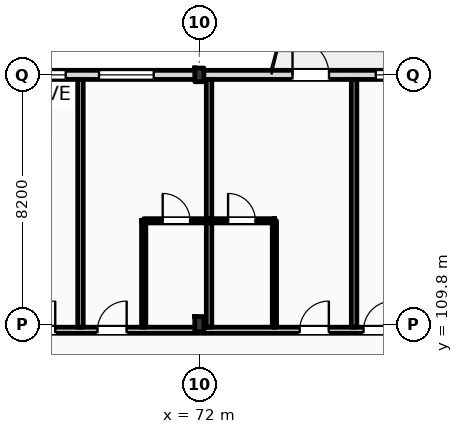
"""IFC4 building model, lengths in metres.
Left out: names, types, materials, properties, quantities, classifications, styles, units other than length and angle.
Written with IfcOpenShell. Run it as: python <this file> out.ifc"""

import sys

from ifc_helpers import new_model, si_unit, direction, frame, frame_2d, origin, origin_2d, place, context, subcontext, project, spatial, rectangle, i_section, extrude, element, fill, save


model = new_model("IFC4")
c1 = context("Model", 3, precision=1e-05, world=origin(), true_north=direction((0.0, 1.0)))
c2 = subcontext(c1, "Body", "Model", "MODEL_VIEW")
j1 = project(units=[si_unit("LENGTHUNIT", "METRE"), si_unit("PLANEANGLEUNIT", "RADIAN")], contexts=[c1])
p1 = place(None, origin())
s1 = spatial("IfcSite", under=j1, at=p1, CompositionType="ELEMENT")
p2 = place(p1, origin())
s2 = spatial("IfcBuilding", under=s1, at=p2, CompositionType="ELEMENT")
p3 = place(p2, frame((0.0, 0.0, 35.4)))
s3 = spatial("IfcBuildingStorey", under=s2, at=p3, CompositionType="ELEMENT", Elevation=35.4)
p4 = place(p3, frame((72.0, 109.8, 0.0), z_axis=(0.0, 0.0, 1.0), x_axis=(1.0, 0.0, 0.0)))
e1 = element("IfcColumn", 1, at=p4, inside=s3, PredefinedType="COLUMN", context=c2, shape_type="SweptSolid", body=[
    extrude(i_section(OverallWidth=0.3, OverallDepth=0.5, WebThickness=0.014, FlangeThickness=0.028, FilletRadius=0.027, at=origin_2d()), origin(), (0.0, 0.0, 1.0), 3.6),
])
p5 = place(p3, frame((72.0, 118.0, 0.0), z_axis=(0.0, 0.0, 1.0), x_axis=(1.0, 0.0, 0.0)))
e2 = element("IfcColumn", 2, at=p5, inside=s3, PredefinedType="COLUMN", context=c2, shape_type="SweptSolid", body=[
    extrude(i_section(OverallWidth=0.3, OverallDepth=0.45, WebThickness=0.014, FlangeThickness=0.026, FilletRadius=0.027, at=origin_2d()), origin(), (0.0, 0.0, 1.0), 3.6),
])
p6 = place(p3, frame((22.5, 118.0, 0.0), z_axis=(0.0, 0.0, 1.0), x_axis=(1.0, 0.0, 0.0)))
e3 = element("IfcWall", 3, at=p6, inside=s3, PredefinedType="STANDARD", context=c2, shape_type="SweptSolid", body=[
    extrude(rectangle(XDim=72.9, YDim=0.3, at=frame_2d((36.45, 0.0))), origin(), (0.0, 0.0, 1.0), 2.92),
])
p7 = place(p6, frame((0.91, 0.0, 0.9)))
e4 = element("IfcOpeningElement", 4, at=p7, cuts=e3, PredefinedType="OPENING", context=c2, shape_type="SweptSolid", body=[
    extrude(rectangle(XDim=0.9, YDim=1.84, at=frame_2d((0.45, 0.92))), frame((0.0, 0.16, 0.0), z_axis=(0.0, -1.0, 0.0), x_axis=(1.0, 0.0, 0.0)), (0.0, 0.0, 1.0), 0.32),
])
p8 = place(p6, frame((6.665, 0.0, 0.0)))
e5 = element("IfcOpeningElement", 5, at=p8, cuts=e3, PredefinedType="OPENING", context=c2, shape_type="SweptSolid", body=[
    extrude(rectangle(XDim=1.2, YDim=2.25, at=frame_2d((0.6, 1.125))), frame((0.0, 0.16, 0.0), z_axis=(0.0, -1.0, 0.0), x_axis=(1.0, 0.0, 0.0)), (0.0, 0.0, 1.0), 0.32),
])
p9 = place(p6, frame((11.355, 0.0, 0.9)))
e6 = element("IfcOpeningElement", 6, at=p9, cuts=e3, PredefinedType="OPENING", context=c2, shape_type="SweptSolid", body=[
    extrude(rectangle(XDim=1.1, YDim=1.5, at=frame_2d((0.55, 0.75))), frame((0.0, 0.16, 0.0), z_axis=(0.0, -1.0, 0.0), x_axis=(1.0, 0.0, 0.0)), (0.0, 0.0, 1.0), 0.32),
])
p10 = place(p6, frame((15.58, 0.0, 0.9)))
e7 = element("IfcOpeningElement", 7, at=p10, cuts=e3, PredefinedType="OPENING", context=c2, shape_type="SweptSolid", body=[
    extrude(rectangle(XDim=1.25, YDim=1.6, at=frame_2d((0.625, 0.8))), frame((0.0, 0.16, 0.0), z_axis=(0.0, -1.0, 0.0), x_axis=(1.0, 0.0, 0.0)), (0.0, 0.0, 1.0), 0.32),
])
p11 = place(p6, frame((21.08, 0.0, 0.0)))
e8 = element("IfcOpeningElement", 8, at=p11, cuts=e3, PredefinedType="OPENING", context=c2, shape_type="SweptSolid", body=[
    extrude(rectangle(XDim=1.2, YDim=2.25, at=frame_2d((0.6, 1.125))), frame((0.0, 0.16, 0.0), z_axis=(0.0, -1.0, 0.0), x_axis=(1.0, 0.0, 0.0)), (0.0, 0.0, 1.0), 0.32),
])
p12 = place(p6, frame((23.54, 0.0, 0.0)))
e9 = element("IfcOpeningElement", 9, at=p12, cuts=e3, PredefinedType="OPENING", context=c2, shape_type="SweptSolid", body=[
    extrude(rectangle(XDim=1.2, YDim=2.25, at=frame_2d((0.6, 1.125))), frame((0.0, 0.16, 0.0), z_axis=(0.0, -1.0, 0.0), x_axis=(1.0, 0.0, 0.0)), (0.0, 0.0, 1.0), 0.32),
])
p13 = place(p6, frame((28.83, 0.0, 0.9)))
e10 = element("IfcOpeningElement", 10, at=p13, cuts=e3, PredefinedType="OPENING", context=c2, shape_type="SweptSolid", body=[
    extrude(rectangle(XDim=1.75, YDim=1.84, at=frame_2d((0.875, 0.92))), frame((0.0, 0.16, 0.0), z_axis=(0.0, -1.0, 0.0), x_axis=(1.0, 0.0, 0.0)), (0.0, 0.0, 1.0), 0.32),
])
p14 = place(p6, frame((34.805, 0.0, 0.9)))
e11 = element("IfcOpeningElement", 11, at=p14, cuts=e3, PredefinedType="OPENING", context=c2, shape_type="SweptSolid", body=[
    extrude(rectangle(XDim=1.35, YDim=1.84, at=frame_2d((0.675, 0.92))), frame((0.0, 0.16, 0.0), z_axis=(0.0, -1.0, 0.0), x_axis=(1.0, 0.0, 0.0)), (0.0, 0.0, 1.0), 0.32),
])
p15 = place(p6, frame((38.105, 0.0, 0.0)))
e12 = element("IfcOpeningElement", 12, at=p15, cuts=e3, PredefinedType="OPENING", context=c2, shape_type="SweptSolid", body=[
    extrude(rectangle(XDim=1.2, YDim=2.25, at=frame_2d((0.6, 1.125))), frame((0.0, 0.16, 0.0), z_axis=(0.0, -1.0, 0.0), x_axis=(1.0, 0.0, 0.0)), (0.0, 0.0, 1.0), 0.32),
])
p16 = place(p6, frame((42.505, 0.0, 0.9)))
e13 = element("IfcOpeningElement", 13, at=p16, cuts=e3, PredefinedType="OPENING", context=c2, shape_type="SweptSolid", body=[
    extrude(rectangle(XDim=2.6, YDim=1.84, at=frame_2d((1.3, 0.92))), frame((0.0, 0.16, 0.0), z_axis=(0.0, -1.0, 0.0), x_axis=(1.0, 0.0, 0.0)), (0.0, 0.0, 1.0), 0.32),
])
p17 = place(p6, frame((46.2, 0.0, 0.9)))
e14 = element("IfcOpeningElement", 14, at=p17, cuts=e3, PredefinedType="OPENING", context=c2, shape_type="SweptSolid", body=[
    extrude(rectangle(XDim=1.8, YDim=1.84, at=frame_2d((0.9, 0.92))), frame((0.0, 0.16, 0.0), z_axis=(0.0, -1.0, 0.0), x_axis=(1.0, 0.0, 0.0)), (0.0, 0.0, 1.0), 0.32),
])
p18 = place(p6, frame((52.565, 0.0, 0.0)))
e15 = element("IfcOpeningElement", 15, at=p18, cuts=e3, PredefinedType="OPENING", context=c2, shape_type="SweptSolid", body=[
    extrude(rectangle(XDim=1.2, YDim=2.25, at=frame_2d((0.6, 1.125))), frame((0.0, 0.16, 0.0), z_axis=(0.0, -1.0, 0.0), x_axis=(1.0, 0.0, 0.0)), (0.0, 0.0, 1.0), 0.32),
])
p19 = place(p6, frame((55.305, 0.0, 0.9)))
e16 = element("IfcOpeningElement", 16, at=p19, cuts=e3, PredefinedType="OPENING", context=c2, shape_type="SweptSolid", body=[
    extrude(rectangle(XDim=1.2, YDim=1.8, at=frame_2d((0.6, 0.9))), frame((0.0, 0.16, 0.0), z_axis=(0.0, -1.0, 0.0), x_axis=(1.0, 0.0, 0.0)), (0.0, 0.0, 1.0), 0.32),
])
p20 = place(p6, frame((60.53, 0.0, 0.9)))
e17 = element("IfcOpeningElement", 17, at=p20, cuts=e3, PredefinedType="OPENING", context=c2, shape_type="SweptSolid", body=[
    extrude(rectangle(XDim=1.35, YDim=1.84, at=frame_2d((0.675, 0.92))), frame((0.0, 0.16, 0.0), z_axis=(0.0, -1.0, 0.0), x_axis=(1.0, 0.0, 0.0)), (0.0, 0.0, 1.0), 0.32),
])
p21 = place(p6, frame((65.955, 0.0, 0.9)))
e18 = element("IfcOpeningElement", 18, at=p21, cuts=e3, PredefinedType="OPENING", context=c2, shape_type="SweptSolid", body=[
    extrude(rectangle(XDim=1.35, YDim=1.84, at=frame_2d((0.675, 0.92))), frame((0.0, 0.16, 0.0), z_axis=(0.0, -1.0, 0.0), x_axis=(1.0, 0.0, 0.0)), (0.0, 0.0, 1.0), 0.32),
])
p22 = place(p6, frame((69.335, 0.0, 0.9)))
e19 = element("IfcOpeningElement", 19, at=p22, cuts=e3, PredefinedType="OPENING", context=c2, shape_type="SweptSolid", body=[
    extrude(rectangle(XDim=1.65, YDim=1.84, at=frame_2d((0.825, 0.92))), frame((0.0, 0.16, 0.0), z_axis=(0.0, -1.0, 0.0), x_axis=(1.0, 0.0, 0.0)), (0.0, 0.0, 1.0), 0.32),
])
p23 = place(p3, frame((10.65, 109.6, 0.0), z_axis=(0.0, 0.0, 1.0), x_axis=(1.0, 0.0, 0.0)))
e20 = element("IfcWall", 20, at=p23, inside=s3, PredefinedType="PARTITIONING", context=c2, shape_type="SweptSolid", body=[
    extrude(rectangle(XDim=84.61, YDim=0.2, at=frame_2d((42.305, 0.0))), origin(), (0.0, 0.0, 1.0), 2.82),
])
p24 = place(p23, frame((12.675, 0.0, 0.0)))
e21 = element("IfcOpeningElement", 21, at=p24, cuts=e20, PredefinedType="OPENING", context=c2, shape_type="SweptSolid", body=[
    extrude(rectangle(XDim=1.02, YDim=2.2, at=frame_2d((0.51, 1.1))), frame((0.0, 0.11, 0.0), z_axis=(0.0, -1.0, 0.0), x_axis=(1.0, 0.0, 0.0)), (0.0, 0.0, 1.0), 0.22),
])
p25 = place(p23, frame((19.62, 0.0, 0.0)))
e22 = element("IfcOpeningElement", 22, at=p25, cuts=e20, PredefinedType="OPENING", context=c2, shape_type="SweptSolid", body=[
    extrude(rectangle(XDim=1.02, YDim=2.2, at=frame_2d((0.51, 1.1))), frame((0.0, 0.11, 0.0), z_axis=(0.0, -1.0, 0.0), x_axis=(1.0, 0.0, 0.0)), (0.0, 0.0, 1.0), 0.22),
])
p26 = place(p23, frame((24.12, 0.0, 0.0)))
e23 = element("IfcOpeningElement", 23, at=p26, cuts=e20, PredefinedType="OPENING", context=c2, shape_type="SweptSolid", body=[
    extrude(rectangle(XDim=1.02, YDim=2.2, at=frame_2d((0.51, 1.1))), frame((0.0, 0.11, 0.0), z_axis=(0.0, -1.0, 0.0), x_axis=(1.0, 0.0, 0.0)), (0.0, 0.0, 1.0), 0.22),
])
p27 = place(p23, frame((26.47, 0.0, 0.0)))
e24 = element("IfcOpeningElement", 24, at=p27, cuts=e20, PredefinedType="OPENING", context=c2, shape_type="SweptSolid", body=[
    extrude(rectangle(XDim=1.02, YDim=2.2, at=frame_2d((0.51, 1.1))), frame((0.0, 0.11, 0.0), z_axis=(0.0, -1.0, 0.0), x_axis=(1.0, 0.0, 0.0)), (0.0, 0.0, 1.0), 0.22),
])
p28 = place(p23, frame((33.15, 0.0, 0.0)))
e25 = element("IfcOpeningElement", 25, at=p28, cuts=e20, PredefinedType="OPENING", context=c2, shape_type="SweptSolid", body=[
    extrude(rectangle(XDim=0.96, YDim=2.2, at=frame_2d((0.48, 1.1))), frame((0.0, 0.11, 0.0), z_axis=(0.0, -1.0, 0.0), x_axis=(1.0, 0.0, 0.0)), (0.0, 0.0, 1.0), 0.22),
])
p29 = place(p23, frame((35.5, 0.0, 0.0)))
e26 = element("IfcOpeningElement", 26, at=p29, cuts=e20, PredefinedType="OPENING", context=c2, shape_type="SweptSolid", body=[
    extrude(rectangle(XDim=0.96, YDim=2.2, at=frame_2d((0.48, 1.1))), frame((0.0, 0.11, 0.0), z_axis=(0.0, -1.0, 0.0), x_axis=(1.0, 0.0, 0.0)), (0.0, 0.0, 1.0), 0.22),
])
p30 = place(p23, frame((42.15, 0.0, 0.0)))
e27 = element("IfcOpeningElement", 27, at=p30, cuts=e20, PredefinedType="OPENING", context=c2, shape_type="SweptSolid", body=[
    extrude(rectangle(XDim=0.96, YDim=2.2, at=frame_2d((0.48, 1.1))), frame((0.0, 0.11, 0.0), z_axis=(0.0, -1.0, 0.0), x_axis=(1.0, 0.0, 0.0)), (0.0, 0.0, 1.0), 0.22),
])
p31 = place(p23, frame((47.15, 0.0, 0.0)))
e28 = element("IfcOpeningElement", 28, at=p31, cuts=e20, PredefinedType="OPENING", context=c2, shape_type="SweptSolid", body=[
    extrude(rectangle(XDim=0.96, YDim=2.2, at=frame_2d((0.48, 1.1))), frame((0.0, 0.11, 0.0), z_axis=(0.0, -1.0, 0.0), x_axis=(1.0, 0.0, 0.0)), (0.0, 0.0, 1.0), 0.22),
])
p32 = place(p23, frame((51.15, 0.0, 0.0)))
e29 = element("IfcOpeningElement", 29, at=p32, cuts=e20, PredefinedType="OPENING", context=c2, shape_type="SweptSolid", body=[
    extrude(rectangle(XDim=0.96, YDim=2.2, at=frame_2d((0.48, 1.1))), frame((0.0, 0.11, 0.0), z_axis=(0.0, -1.0, 0.0), x_axis=(1.0, 0.0, 0.0)), (0.0, 0.0, 1.0), 0.22),
])
p33 = place(p23, frame((55.65, 0.0, 0.0)))
e30 = element("IfcOpeningElement", 30, at=p33, cuts=e20, PredefinedType="OPENING", context=c2, shape_type="SweptSolid", body=[
    extrude(rectangle(XDim=0.96, YDim=2.2, at=frame_2d((0.48, 1.1))), frame((0.0, 0.11, 0.0), z_axis=(0.0, -1.0, 0.0), x_axis=(1.0, 0.0, 0.0)), (0.0, 0.0, 1.0), 0.22),
])
p34 = place(p23, frame((58.0, 0.0, 0.0)))
e31 = element("IfcOpeningElement", 31, at=p34, cuts=e20, PredefinedType="OPENING", context=c2, shape_type="SweptSolid", body=[
    extrude(rectangle(XDim=0.96, YDim=2.2, at=frame_2d((0.48, 1.1))), frame((0.0, 0.11, 0.0), z_axis=(0.0, -1.0, 0.0), x_axis=(1.0, 0.0, 0.0)), (0.0, 0.0, 1.0), 0.22),
])
p35 = place(p23, frame((64.65, 0.0, 0.0)))
e32 = element("IfcOpeningElement", 32, at=p35, cuts=e20, PredefinedType="OPENING", context=c2, shape_type="SweptSolid", body=[
    extrude(rectangle(XDim=0.96, YDim=2.2, at=frame_2d((0.48, 1.1))), frame((0.0, 0.11, 0.0), z_axis=(0.0, -1.0, 0.0), x_axis=(1.0, 0.0, 0.0)), (0.0, 0.0, 1.0), 0.22),
])
p36 = place(p23, frame((66.75, 0.0, 0.0)))
e33 = element("IfcOpeningElement", 33, at=p36, cuts=e20, PredefinedType="OPENING", context=c2, shape_type="SweptSolid", body=[
    extrude(rectangle(XDim=0.96, YDim=2.2, at=frame_2d((0.48, 1.1))), frame((0.0, 0.11, 0.0), z_axis=(0.0, -1.0, 0.0), x_axis=(1.0, 0.0, 0.0)), (0.0, 0.0, 1.0), 0.22),
])
p37 = place(p23, frame((73.65, 0.0, 0.0)))
e34 = element("IfcOpeningElement", 34, at=p37, cuts=e20, PredefinedType="OPENING", context=c2, shape_type="SweptSolid", body=[
    extrude(rectangle(XDim=0.96, YDim=2.2, at=frame_2d((0.48, 1.1))), frame((0.0, 0.11, 0.0), z_axis=(0.0, -1.0, 0.0), x_axis=(1.0, 0.0, 0.0)), (0.0, 0.0, 1.0), 0.22),
])
p38 = place(p23, frame((78.4, 0.0, 0.0)))
e35 = element("IfcOpeningElement", 35, at=p38, cuts=e20, PredefinedType="OPENING", context=c2, shape_type="SweptSolid", body=[
    extrude(rectangle(XDim=0.96, YDim=2.2, at=frame_2d((0.48, 1.1))), frame((0.0, 0.11, 0.0), z_axis=(0.0, -1.0, 0.0), x_axis=(1.0, 0.0, 0.0)), (0.0, 0.0, 1.0), 0.22),
])
p39 = place(p23, frame((80.455, 0.0, 0.0)))
e36 = element("IfcOpeningElement", 36, at=p39, cuts=e20, PredefinedType="OPENING", context=c2, shape_type="SweptSolid", body=[
    extrude(rectangle(XDim=0.96, YDim=2.2, at=frame_2d((0.48, 1.1))), frame((0.0, 0.11, 0.0), z_axis=(0.0, -1.0, 0.0), x_axis=(1.0, 0.0, 0.0)), (0.0, 0.0, 1.0), 0.22),
])
p40 = place(p23, frame((2.716, 0.0, 0.0)))
e37 = element("IfcOpeningElement", 37, at=p40, cuts=e20, PredefinedType="OPENING", context=c2, shape_type="SweptSolid", body=[
    extrude(rectangle(XDim=1.35, YDim=2.25, at=frame_2d((0.675, 1.125))), frame((0.0, 0.11, 0.0), z_axis=(0.0, -1.0, 0.0), x_axis=(1.0, 0.0, 0.0)), (0.0, 0.0, 1.0), 0.22),
])
p41 = place(p23, frame((6.65, 0.0, 0.0)))
e38 = element("IfcOpeningElement", 38, at=p41, cuts=e20, PredefinedType="OPENING", context=c2, shape_type="SweptSolid", body=[
    extrude(rectangle(XDim=1.35, YDim=2.25, at=frame_2d((0.675, 1.125))), frame((0.0, 0.11, 0.0), z_axis=(0.0, -1.0, 0.0), x_axis=(1.0, 0.0, 0.0)), (0.0, 0.0, 1.0), 0.22),
])
p42 = place(p23, frame((10.583, 0.0, 0.0)))
e39 = element("IfcOpeningElement", 39, at=p42, cuts=e20, PredefinedType="OPENING", context=c2, shape_type="SweptSolid", body=[
    extrude(rectangle(XDim=1.35, YDim=2.25, at=frame_2d((0.675, 1.125))), frame((0.0, 0.11, 0.0), z_axis=(0.0, -1.0, 0.0), x_axis=(1.0, 0.0, 0.0)), (0.0, 0.0, 1.0), 0.22),
])
for number, where, z_axis, x_axis in (
    (40, (68.09, 109.7, 0.0), (0.0, 0.0, 1.0), (0.0, 1.0, 0.0)),
    (41, (72.32, 109.7, 0.0), (0.0, 0.0, 1.0), (0.0, 1.0, 0.0)),
):
    element("IfcWall", number, at=place(p3, frame(where, z_axis=z_axis, x_axis=x_axis)), inside=s3, PredefinedType="PARTITIONING", context=c2, shape_type="SweptSolid", body=[
        extrude(rectangle(XDim=8.15, YDim=0.18, at=frame_2d((4.075, 0.0))), origin(), (0.0, 0.0, 1.0), 3.38),
    ])
p43 = place(p3, frame((70.17, 109.7, 0.0), z_axis=(0.0, 0.0, 1.0), x_axis=(0.0, 1.0, 0.0)))
e42 = element("IfcWall", 42, at=p43, inside=s3, PredefinedType="PARTITIONING", context=c2, shape_type="SweptSolid", body=[
    extrude(rectangle(XDim=3.5, YDim=0.14, at=frame_2d((1.75, 0.0))), origin(), (0.0, 0.0, 1.0), 3.38),
])
p44 = place(p3, frame((70.17, 113.2, 0.0), z_axis=(0.0, 0.0, 1.0), x_axis=(1.0, 0.0, 0.0)))
e43 = element("IfcWall", 43, at=p44, inside=s3, PredefinedType="PARTITIONING", context=c2, shape_type="SweptSolid", body=[
    extrude(rectangle(XDim=2.15, YDim=0.14, at=frame_2d((1.075, 0.0))), origin(), (0.0, 0.0, 1.0), 3.38),
])
p45 = place(p44, frame((0.625, 0.0, 0.0)))
e44 = element("IfcOpeningElement", 44, at=p45, cuts=e43, PredefinedType="OPENING", context=c2, shape_type="SweptSolid", body=[
    extrude(rectangle(XDim=0.9, YDim=2.1, at=frame_2d((0.45, 1.05))), frame((0.0, 0.08, 0.0), z_axis=(0.0, -1.0, 0.0), x_axis=(1.0, 0.0, 0.0)), (0.0, 0.0, 1.0), 0.16),
])
p46 = place(p3, frame((77.09, 109.7, 0.0), z_axis=(0.0, 0.0, 1.0), x_axis=(0.0, 1.0, 0.0)))
e45 = element("IfcWall", 45, at=p46, inside=s3, PredefinedType="PARTITIONING", context=c2, shape_type="SweptSolid", body=[
    extrude(rectangle(XDim=8.15, YDim=0.18, at=frame_2d((4.075, 0.0))), origin(), (0.0, 0.0, 1.0), 3.07),
])
p47 = place(p3, frame((74.47, 109.7, 0.0), z_axis=(0.0, 0.0, 1.0), x_axis=(0.0, 1.0, 0.0)))
e46 = element("IfcWall", 46, at=p47, inside=s3, PredefinedType="PARTITIONING", context=c2, shape_type="SweptSolid", body=[
    extrude(rectangle(XDim=3.5, YDim=0.14, at=frame_2d((1.75, 0.0))), origin(), (0.0, 0.0, 1.0), 3.07),
])
p48 = place(p3, frame((72.32, 113.2, 0.0), z_axis=(0.0, 0.0, 1.0), x_axis=(1.0, 0.0, 0.0)))
e47 = element("IfcWall", 47, at=p48, inside=s3, PredefinedType="PARTITIONING", context=c2, shape_type="SweptSolid", body=[
    extrude(rectangle(XDim=2.15, YDim=0.14, at=frame_2d((1.075, 0.0))), origin(), (0.0, 0.0, 1.0), 3.38),
])
p49 = place(p48, frame((0.625, 0.0, 0.0)))
e48 = element("IfcOpeningElement", 48, at=p49, cuts=e47, PredefinedType="OPENING", context=c2, shape_type="SweptSolid", body=[
    extrude(rectangle(XDim=0.9, YDim=2.1, at=frame_2d((0.45, 1.05))), frame((0.0, 0.08, 0.0), z_axis=(0.0, -1.0, 0.0), x_axis=(1.0, 0.0, 0.0)), (0.0, 0.0, 1.0), 0.16),
])
p50 = place(p16, origin())
e49 = element("IfcWindow", 49, at=p50, inside=s3, PartitioningType="DOUBLE_PANEL_VERTICAL", PredefinedType="WINDOW", context=c2, shape_type="SweptSolid", body=[
    extrude(rectangle(XDim=2.6, YDim=1.84, at=frame_2d((1.3, 0.92))), frame((0.0, 0.03, 0.0), z_axis=(0.0, -1.0, 0.0), x_axis=(1.0, 0.0, 0.0)), (0.0, 0.0, 1.0), 0.06),
])
fill(e13, e49)
p51 = place(p17, origin())
e50 = element("IfcWindow", 50, at=p51, inside=s3, PartitioningType="DOUBLE_PANEL_VERTICAL", PredefinedType="WINDOW", context=c2, shape_type="SweptSolid", body=[
    extrude(rectangle(XDim=1.8, YDim=1.84, at=frame_2d((0.9, 0.92))), frame((0.0, 0.03, 0.0), z_axis=(0.0, -1.0, 0.0), x_axis=(1.0, 0.0, 0.0)), (0.0, 0.0, 1.0), 0.06),
])
fill(e14, e50)
p52 = place(p18, origin())
e51 = element("IfcDoor", 51, at=p52, inside=s3, OperationType="SINGLE_SWING_LEFT", PredefinedType="DOOR", context=c2, shape_type="SweptSolid", body=[
    extrude(rectangle(XDim=1.2, YDim=2.25, at=frame_2d((0.6, 1.125))), frame((0.0, 0.025, 0.0), z_axis=(0.0, -1.0, 0.0), x_axis=(1.0, 0.0, 0.0)), (0.0, 0.0, 1.0), 0.05),
])
fill(e15, e51)
p53 = place(p19, origin())
e52 = element("IfcWindow", 52, at=p53, inside=s3, PartitioningType="DOUBLE_PANEL_VERTICAL", PredefinedType="WINDOW", context=c2, shape_type="SweptSolid", body=[
    extrude(rectangle(XDim=1.2, YDim=1.8, at=frame_2d((0.6, 0.9))), frame((0.0, 0.03, 0.0), z_axis=(0.0, -1.0, 0.0), x_axis=(1.0, 0.0, 0.0)), (0.0, 0.0, 1.0), 0.06),
])
fill(e16, e52)
p54 = place(p33, origin())
e53 = element("IfcDoor", 53, at=p54, inside=s3, OperationType="SINGLE_SWING_RIGHT", PredefinedType="DOOR", context=c2, shape_type="SweptSolid", body=[
    extrude(rectangle(XDim=0.96, YDim=2.2, at=frame_2d((0.48, 1.1))), frame((0.0, 0.025, 0.0), z_axis=(0.0, -1.0, 0.0), x_axis=(1.0, 0.0, 0.0)), (0.0, 0.0, 1.0), 0.05),
])
fill(e30, e53)
p55 = place(p34, origin())
e54 = element("IfcDoor", 54, at=p55, inside=s3, OperationType="SINGLE_SWING_RIGHT", PredefinedType="DOOR", context=c2, shape_type="SweptSolid", body=[
    extrude(rectangle(XDim=0.96, YDim=2.2, at=frame_2d((0.48, 1.1))), frame((0.0, 0.025, 0.0), z_axis=(0.0, -1.0, 0.0), x_axis=(1.0, 0.0, 0.0)), (0.0, 0.0, 1.0), 0.05),
])
fill(e31, e54)
p56 = place(p45, origin())
e55 = element("IfcDoor", 55, at=p56, inside=s3, OperationType="SINGLE_SWING_LEFT", PredefinedType="DOOR", context=c2, shape_type="SweptSolid", body=[
    extrude(rectangle(XDim=0.9, YDim=2.1, at=frame_2d((0.45, 1.05))), frame((0.0, 0.025, 0.0), z_axis=(0.0, -1.0, 0.0), x_axis=(1.0, 0.0, 0.0)), (0.0, 0.0, 1.0), 0.05),
])
fill(e44, e55)
p57 = place(p35, origin())
e56 = element("IfcDoor", 56, at=p57, inside=s3, OperationType="SINGLE_SWING_RIGHT", PredefinedType="DOOR", context=c2, shape_type="SweptSolid", body=[
    extrude(rectangle(XDim=0.96, YDim=2.2, at=frame_2d((0.48, 1.1))), frame((0.0, 0.025, 0.0), z_axis=(0.0, -1.0, 0.0), x_axis=(1.0, 0.0, 0.0)), (0.0, 0.0, 1.0), 0.05),
])
fill(e32, e56)
p58 = place(p49, origin())
e57 = element("IfcDoor", 57, at=p58, inside=s3, OperationType="SINGLE_SWING_LEFT", PredefinedType="DOOR", context=c2, shape_type="SweptSolid", body=[
    extrude(rectangle(XDim=0.9, YDim=2.1, at=frame_2d((0.45, 1.05))), frame((0.0, 0.025, 0.0), z_axis=(0.0, -1.0, 0.0), x_axis=(1.0, 0.0, 0.0)), (0.0, 0.0, 1.0), 0.05),
])
fill(e48, e57)
p59 = place(p36, origin())
e58 = element("IfcDoor", 58, at=p59, inside=s3, OperationType="SINGLE_SWING_RIGHT", PredefinedType="DOOR", context=c2, shape_type="SweptSolid", body=[
    extrude(rectangle(XDim=0.96, YDim=2.2, at=frame_2d((0.48, 1.1))), frame((0.0, 0.025, 0.0), z_axis=(0.0, -1.0, 0.0), x_axis=(1.0, 0.0, 0.0)), (0.0, 0.0, 1.0), 0.05),
])
fill(e33, e58)
save(model, sys.argv[1])
